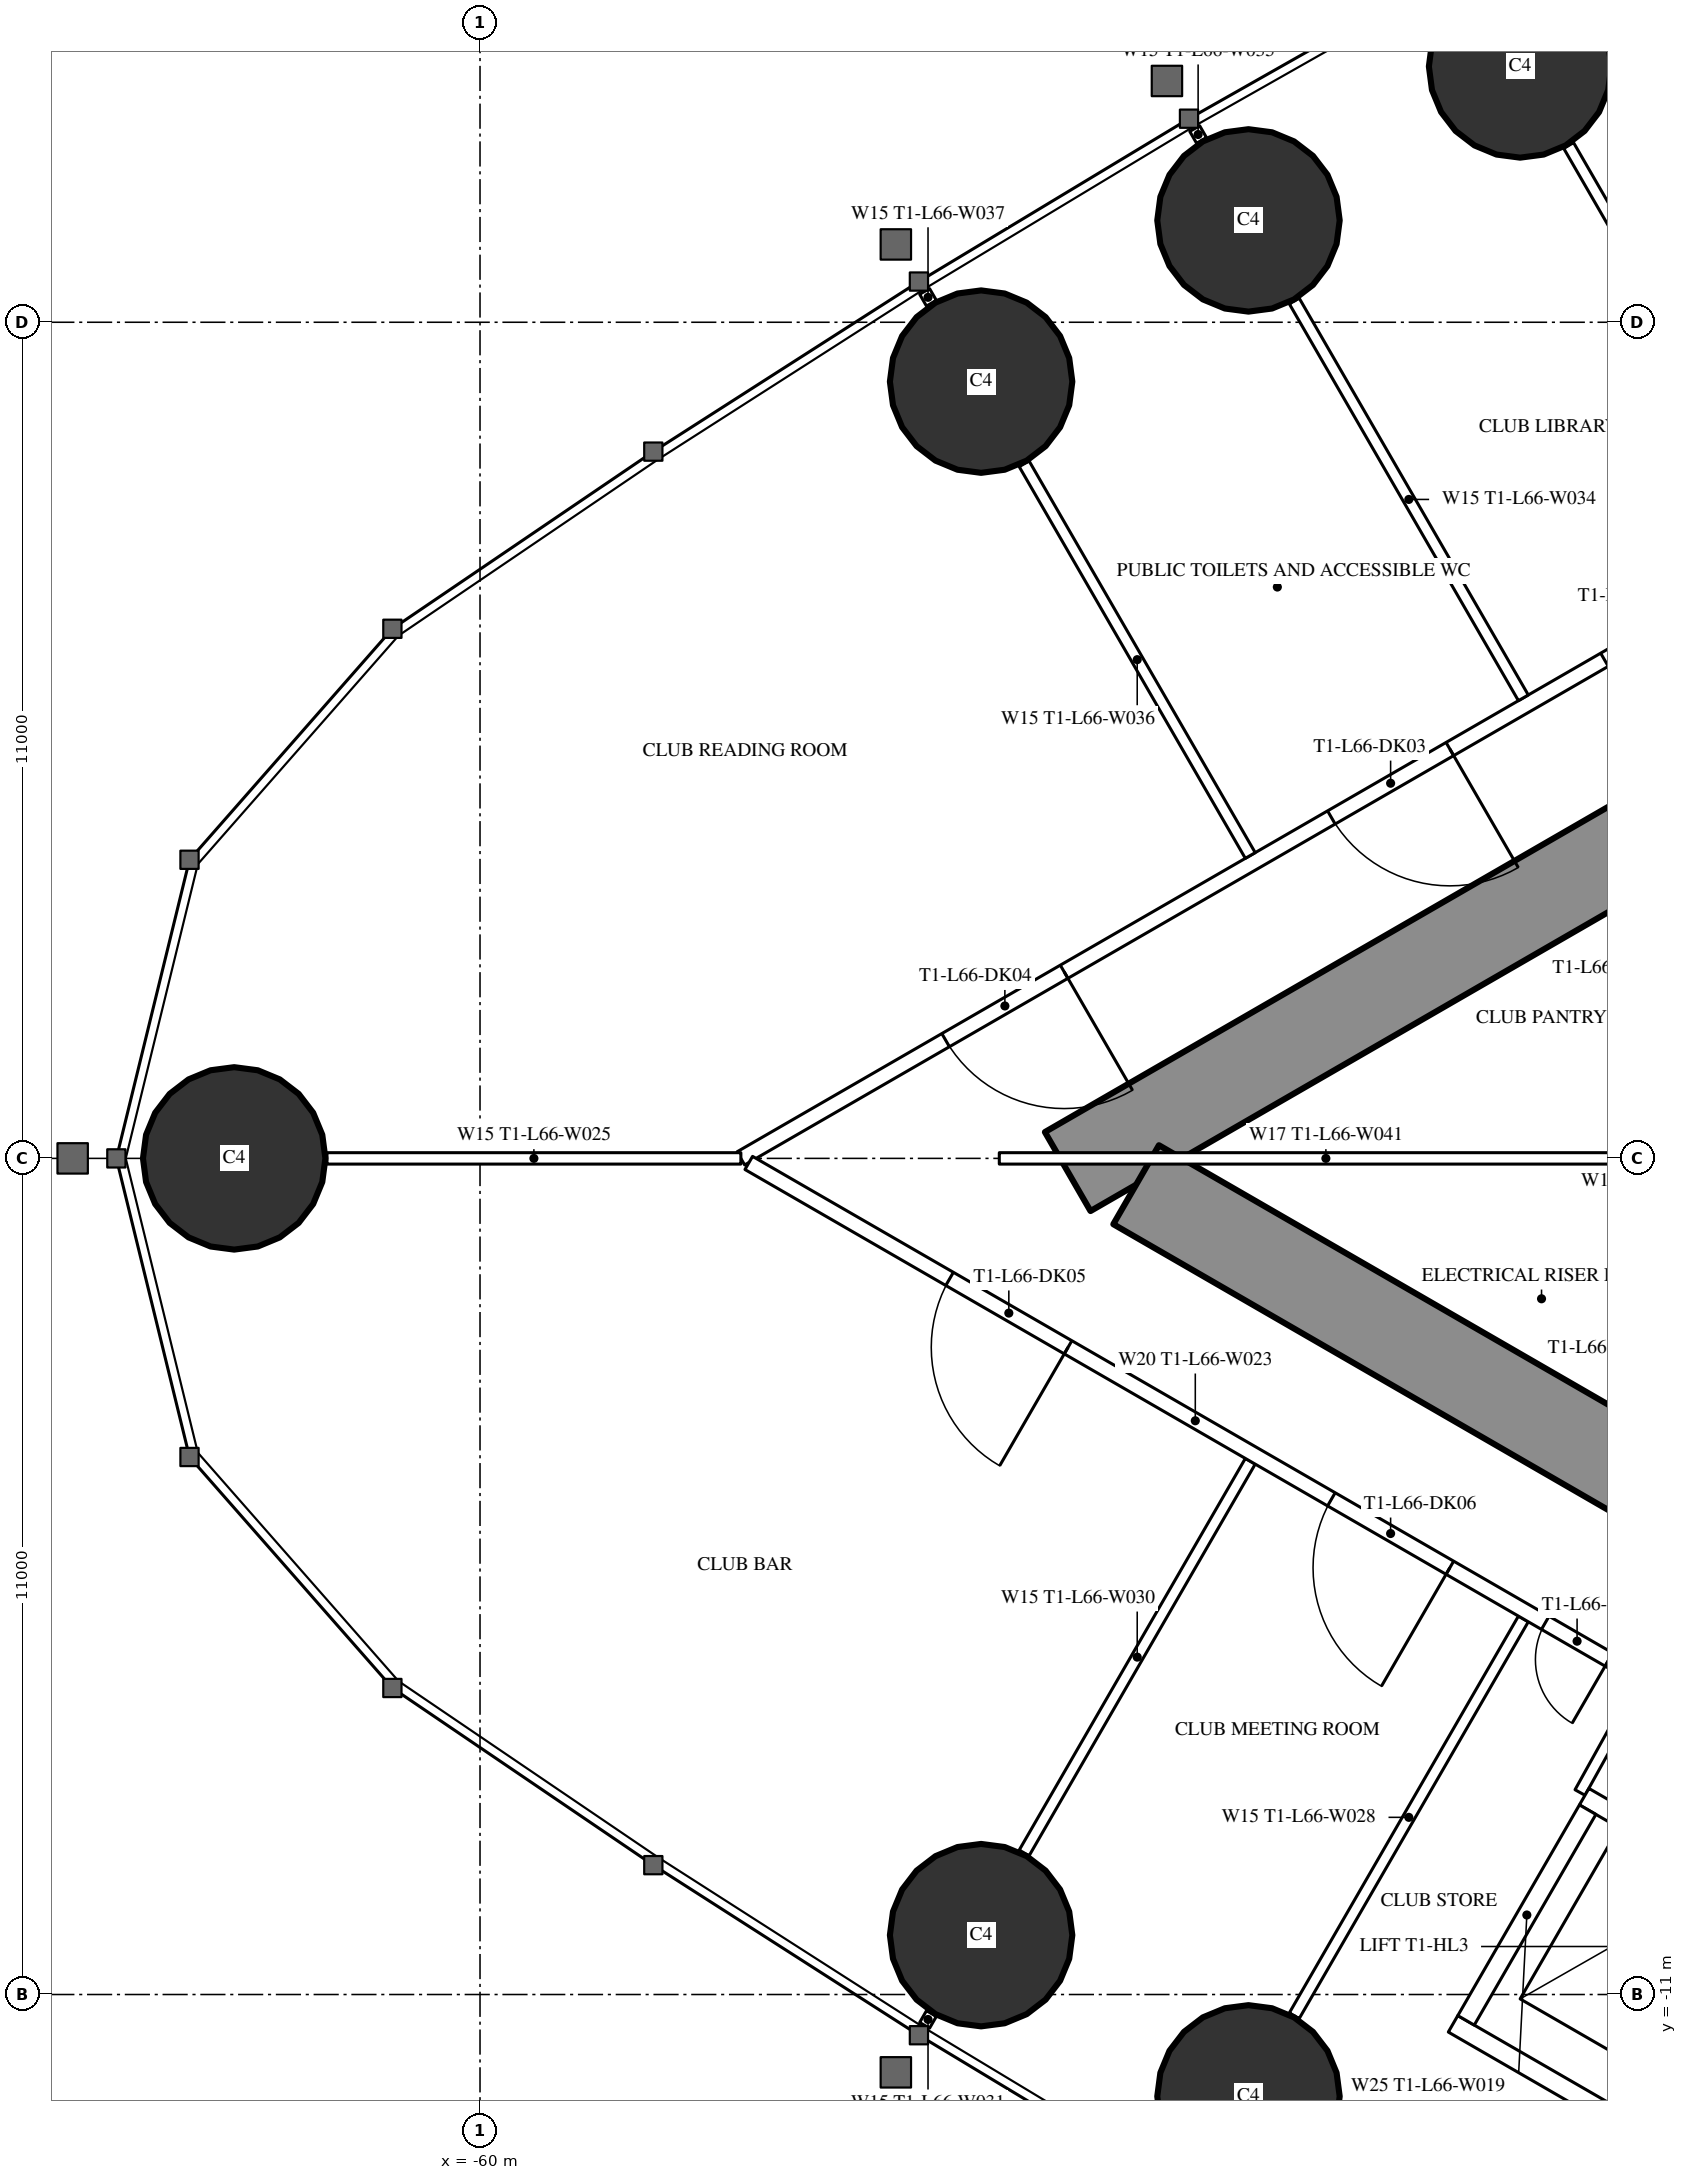
"""IFC4 building model, lengths in metres.
Left out: names, types, materials, properties, quantities, classifications, styles, units other than length and angle.
Written with IfcOpenShell. Run it as: python <this file> out.ifc"""

import sys

from ifc_helpers import new_model, si_unit, direction, frame, frame_2d, origin, origin_2d, place, context, subcontext, project, spatial, rectangle, circle, extrude, element, fill, save


model = new_model("IFC4")
c1 = context("Model", 3, precision=1e-05, world=origin(), true_north=direction((0.0, 1.0)))
c2 = subcontext(c1, "Body", "Model", "MODEL_VIEW")
j1 = project(units=[si_unit("LENGTHUNIT", "METRE"), si_unit("PLANEANGLEUNIT", "RADIAN")], contexts=[c1])
p1 = place(None, origin())
s1 = spatial("IfcSite", under=j1, at=p1, CompositionType="ELEMENT")
p2 = place(p1, origin())
s2 = spatial("IfcBuilding", under=s1, at=p2, CompositionType="ELEMENT")
p3 = place(p2, frame((0.0, 0.0, 247.7)))
s3 = spatial("IfcBuildingStorey", under=s2, at=p3, CompositionType="ELEMENT", Elevation=247.7)
for number, where, z_axis, x_axis in (
    (1, (-63.234, 0.0, 0.0), (0.0, 0.0, 1.0), (1.0, 0.0, 0.0)),
    (2, (-53.408, -10.219, 0.0), (0.0, 0.0, 1.0), (1.0, 0.0, 0.0)),
    (3, (-49.89, -12.34, 0.0), (0.0, 0.0, 1.0), (1.0, 0.0, 0.0)),
    (4, (-46.317, 14.365, 0.0), (0.0, 0.0, 1.0), (1.0, 0.0, 0.0)),
    (5, (-49.89, 12.34, 0.0), (0.0, 0.0, 1.0), (1.0, 0.0, 0.0)),
    (6, (-53.408, 10.219, 0.0), (0.0, 0.0, 1.0), (1.0, 0.0, 0.0)),
):
    element("IfcColumn", number, at=place(p3, frame(where, z_axis=z_axis, x_axis=x_axis)), inside=s3, PredefinedType="COLUMN", context=c2, shape_type="SweptSolid", body=[
        extrude(circle(Radius=1.2, at=origin_2d()), origin(), (0.0, 0.0, 1.0), 4.2),
    ])
p4 = place(p3, frame((-27.2, 14.3, 0.0), z_axis=(0.0, 0.0, 1.0), x_axis=(-0.866026593062, -0.499997940104, 0.0)))
e7 = element("IfcWall", 7, at=p4, inside=s3, PredefinedType="SHEAR", context=c2, shape_type="SweptSolid", body=[
    extrude(rectangle(XDim=28.946, YDim=1.2, at=frame_2d((14.473, 0.0))), origin(), (0.0, 0.0, 1.0), 4.2),
])
p5 = place(p4, frame((4.6, 0.0, 0.0)))
e8 = element("IfcOpeningElement", 8, at=p5, cuts=e7, PredefinedType="OPENING", context=c2, shape_type="SweptSolid", body=[
    extrude(rectangle(XDim=1.0, YDim=2.2, at=frame_2d((0.5, 1.1))), frame((0.0, 0.61, 0.0), z_axis=(0.0, -1.0, 0.0), x_axis=(1.0, 0.0, 0.0)), (0.0, 0.0, 1.0), 1.22),
])
p6 = place(p4, frame((13.395, 0.0, 0.0)))
e9 = element("IfcOpeningElement", 9, at=p6, cuts=e7, PredefinedType="OPENING", context=c2, shape_type="SweptSolid", body=[
    extrude(rectangle(XDim=1.8, YDim=2.2, at=frame_2d((0.9, 1.1))), frame((0.0, 0.61, 0.0), z_axis=(0.0, -1.0, 0.0), x_axis=(1.0, 0.0, 0.0)), (0.0, 0.0, 1.0), 1.22),
])
p7 = place(p3, frame((-27.2, -14.3, 0.0), z_axis=(0.0, 0.0, 1.0), x_axis=(-0.866024021859, 0.500002393557, 0.0)))
e10 = element("IfcWall", 10, at=p7, inside=s3, PredefinedType="SHEAR", context=c2, shape_type="SweptSolid", body=[
    extrude(rectangle(XDim=27.907, YDim=1.2, at=frame_2d((13.954, 0.0))), origin(), (0.0, 0.0, 1.0), 4.2),
])
p8 = place(p7, frame((4.6, 0.0, 0.0)))
e11 = element("IfcOpeningElement", 11, at=p8, cuts=e10, PredefinedType="OPENING", context=c2, shape_type="SweptSolid", body=[
    extrude(rectangle(XDim=1.0, YDim=2.2, at=frame_2d((0.5, 1.1))), frame((0.0, 0.61, 0.0), z_axis=(0.0, -1.0, 0.0), x_axis=(1.0, 0.0, 0.0)), (0.0, 0.0, 1.0), 1.22),
])
p9 = place(p7, frame((13.395, 0.0, 0.0)))
e12 = element("IfcOpeningElement", 12, at=p9, cuts=e10, PredefinedType="OPENING", context=c2, shape_type="SweptSolid", body=[
    extrude(rectangle(XDim=1.8, YDim=2.2, at=frame_2d((0.9, 1.1))), frame((0.0, 0.61, 0.0), z_axis=(0.0, -1.0, 0.0), x_axis=(1.0, 0.0, 0.0)), (0.0, 0.0, 1.0), 1.22),
])
p10 = place(p3, frame((-28.681, 16.101, 0.0), z_axis=(0.0, 0.0, 1.0), x_axis=(-0.866024860443, -0.500000941094, 0.0)))
e13 = element("IfcWall", 13, at=p10, inside=s3, PredefinedType="PARTITIONING", context=c2, shape_type="SweptSolid", body=[
    extrude(rectangle(XDim=32.201, YDim=0.2, at=frame_2d((16.101, 0.0))), origin(), (0.0, 0.0, 1.0), 3.95),
])
p11 = place(p10, frame((7.266, 0.0, 0.0)))
e14 = element("IfcOpeningElement", 14, at=p11, cuts=e13, PredefinedType="OPENING", context=c2, shape_type="SweptSolid", body=[
    extrude(rectangle(XDim=1.8, YDim=2.2, at=frame_2d((0.9, 1.1))), frame((0.0, 0.11, 0.0), z_axis=(0.0, -1.0, 0.0), x_axis=(1.0, 0.0, 0.0)), (0.0, 0.0, 1.0), 0.22),
])
p12 = place(p10, frame((17.281, 0.0, 0.0)))
e15 = element("IfcOpeningElement", 15, at=p12, cuts=e13, PredefinedType="OPENING", context=c2, shape_type="SweptSolid", body=[
    extrude(rectangle(XDim=1.8, YDim=2.2, at=frame_2d((0.9, 1.1))), frame((0.0, 0.11, 0.0), z_axis=(0.0, -1.0, 0.0), x_axis=(1.0, 0.0, 0.0)), (0.0, 0.0, 1.0), 0.22),
])
p13 = place(p10, frame((21.43, 0.0, 0.0)))
e16 = element("IfcOpeningElement", 16, at=p13, cuts=e13, PredefinedType="OPENING", context=c2, shape_type="SweptSolid", body=[
    extrude(rectangle(XDim=1.8, YDim=2.2, at=frame_2d((0.9, 1.1))), frame((0.0, 0.11, 0.0), z_axis=(0.0, -1.0, 0.0), x_axis=(1.0, 0.0, 0.0)), (0.0, 0.0, 1.0), 0.22),
])
p14 = place(p10, frame((27.29, 0.0, 0.0)))
e17 = element("IfcOpeningElement", 17, at=p14, cuts=e13, PredefinedType="OPENING", context=c2, shape_type="SweptSolid", body=[
    extrude(rectangle(XDim=1.8, YDim=2.2, at=frame_2d((0.9, 1.1))), frame((0.0, 0.11, 0.0), z_axis=(0.0, -1.0, 0.0), x_axis=(1.0, 0.0, 0.0)), (0.0, 0.0, 1.0), 0.22),
])
p15 = place(p3, frame((-42.68, 8.134, 0.0), z_axis=(0.0, 0.0, 1.0), x_axis=(-0.499984479505, 0.866034364361, 0.0)))
e18 = element("IfcWall", 18, at=p15, inside=s3, PredefinedType="PARTITIONING", context=c2, shape_type="SweptSolid", body=[
    extrude(rectangle(XDim=5.995, YDim=0.15, at=frame_2d((2.998, 0.0))), origin(), (0.0, 0.0, 1.0), 3.05),
])
p16 = place(p3, frame((-46.274, 6.059, 0.0), z_axis=(0.0, 0.0, 1.0), x_axis=(-0.500020471368, 0.866013584312, 0.0)))
e19 = element("IfcWall", 19, at=p16, inside=s3, PredefinedType="PARTITIONING", context=c2, shape_type="SweptSolid", body=[
    extrude(rectangle(XDim=6.028, YDim=0.15, at=frame_2d((3.014, 0.0))), origin(), (0.0, 0.0, 1.0), 3.05),
])
p17 = place(p3, frame((-50.508, 13.392, 0.0), z_axis=(0.0, 0.0, 1.0), x_axis=(-0.499644091975, 0.866230789891, 0.0)))
e20 = element("IfcWall", 20, at=p17, inside=s3, PredefinedType="PARTITIONING", context=c2, shape_type="SweptSolid", body=[
    extrude(rectangle(XDim=0.18, YDim=0.15, at=frame_2d((0.09, 0.0))), origin(), (0.0, 0.0, 1.0), 3.05),
])
p18 = place(p3, frame((-49.866, 3.985, 0.0), z_axis=(0.0, 0.0, 1.0), x_axis=(-0.500000694566, 0.866025002776, 0.0)))
e21 = element("IfcWall", 21, at=p18, inside=s3, PredefinedType="PARTITIONING", context=c2, shape_type="SweptSolid", body=[
    extrude(rectangle(XDim=5.95, YDim=0.15, at=frame_2d((2.975, 0.0))), origin(), (0.0, 0.0, 1.0), 3.05),
])
p19 = place(p3, frame((-54.061, 11.25, 0.0), z_axis=(0.0, 0.0, 1.0), x_axis=(-0.500391173478, 0.865799441849, 0.0)))
e22 = element("IfcWall", 22, at=p19, inside=s3, PredefinedType="PARTITIONING", context=c2, shape_type="SweptSolid", body=[
    extrude(rectangle(XDim=0.179, YDim=0.15, at=frame_2d((0.089, 0.0))), origin(), (0.0, 0.0, 1.0), 3.05),
])
p20 = place(p3, frame((-46.274, -6.059, 0.0), z_axis=(0.0, 0.0, 1.0), x_axis=(-0.500020471368, -0.866013584312, 0.0)))
e23 = element("IfcWall", 23, at=p20, inside=s3, PredefinedType="PARTITIONING", context=c2, shape_type="SweptSolid", body=[
    extrude(rectangle(XDim=6.028, YDim=0.15, at=frame_2d((3.014, 0.0))), origin(), (0.0, 0.0, 1.0), 3.05),
])
p21 = place(p3, frame((-49.866, -3.985, 0.0), z_axis=(0.0, 0.0, 1.0), x_axis=(-0.500000694566, -0.866025002776, 0.0)))
e24 = element("IfcWall", 24, at=p21, inside=s3, PredefinedType="PARTITIONING", context=c2, shape_type="SweptSolid", body=[
    extrude(rectangle(XDim=5.95, YDim=0.15, at=frame_2d((2.975, 0.0))), origin(), (0.0, 0.0, 1.0), 3.05),
])
p22 = place(p3, frame((-54.061, -11.25, 0.0), z_axis=(0.0, 0.0, 1.0), x_axis=(-0.500391173478, -0.865799441849, 0.0)))
e25 = element("IfcWall", 25, at=p22, inside=s3, PredefinedType="PARTITIONING", context=c2, shape_type="SweptSolid", body=[
    extrude(rectangle(XDim=0.179, YDim=0.15, at=frame_2d((0.089, 0.0))), origin(), (0.0, 0.0, 1.0), 3.05),
])
p23 = place(p3, frame((-56.568, 0.0, 0.0), z_axis=(0.0, 0.0, 1.0), x_axis=(-1.0, 0.0, 0.0)))
e26 = element("IfcWall", 26, at=p23, inside=s3, PredefinedType="PARTITIONING", context=c2, shape_type="SweptSolid", body=[
    extrude(rectangle(XDim=5.446, YDim=0.15, at=frame_2d((2.723, 0.0))), origin(), (0.0, 0.0, 1.0), 3.05),
])
p24 = place(p3, frame((-44.715, -6.844, 0.0), z_axis=(0.0, 0.0, 1.0), x_axis=(-0.866025261224, 0.500000246922, 0.0)))
e27 = element("IfcWall", 27, at=p24, inside=s3, PredefinedType="PARTITIONING", context=c2, shape_type="SweptSolid", body=[
    extrude(rectangle(XDim=13.567, YDim=0.2, at=frame_2d((6.783, 0.0))), origin(), (0.0, 0.0, 1.0), 3.95),
])
p25 = place(p24, frame((8.716, 0.0, 0.0)))
e28 = element("IfcOpeningElement", 28, at=p25, cuts=e27, PredefinedType="OPENING", context=c2, shape_type="SweptSolid", body=[
    extrude(rectangle(XDim=1.8, YDim=2.2, at=frame_2d((0.9, 1.1))), frame((0.0, 0.11, 0.0), z_axis=(0.0, -1.0, 0.0), x_axis=(1.0, 0.0, 0.0)), (0.0, 0.0, 1.0), 0.22),
])
p26 = place(p24, frame((2.916, 0.0, 0.0)))
e29 = element("IfcOpeningElement", 29, at=p26, cuts=e27, PredefinedType="OPENING", context=c2, shape_type="SweptSolid", body=[
    extrude(rectangle(XDim=1.8, YDim=2.2, at=frame_2d((0.9, 1.1))), frame((0.0, 0.11, 0.0), z_axis=(0.0, -1.0, 0.0), x_axis=(1.0, 0.0, 0.0)), (0.0, 0.0, 1.0), 0.22),
])
p27 = place(p24, frame((0.5, 0.0, 0.0)))
e30 = element("IfcOpeningElement", 30, at=p27, cuts=e27, PredefinedType="OPENING", context=c2, shape_type="SweptSolid", body=[
    extrude(rectangle(XDim=0.967, YDim=2.2, at=frame_2d((0.483, 1.1))), frame((0.0, 0.11, 0.0), z_axis=(0.0, -1.0, 0.0), x_axis=(1.0, 0.0, 0.0)), (0.0, 0.0, 1.0), 0.22),
])
p28 = place(p3, frame((-44.652, -6.764, 0.0), z_axis=(0.0, 0.0, 1.0), x_axis=(-0.485528096672, -0.8742210632, 0.0)))
e31 = element("IfcWall", 31, at=p28, inside=s3, PredefinedType="PARTITIONING", context=c2, shape_type="SweptSolid", body=[
    extrude(rectangle(XDim=1.805, YDim=0.15, at=frame_2d((0.903, 0.0))), origin(), (0.0, 0.0, 1.0), 3.95),
])
p29 = place(p3, frame((-44.575, 0.0, 0.0), z_axis=(0.0, 0.0, 1.0), x_axis=(-1.0, 0.0, 0.0)))
e32 = element("IfcWall", 32, at=p29, inside=s3, PredefinedType="PARTITIONING", context=c2, shape_type="SweptSolid", body=[
    extrude(rectangle(XDim=8.593, YDim=0.15, at=frame_2d((4.297, 0.0))), origin(), (0.0, 0.0, 1.0), 3.05),
])
p30 = place(p3, frame((-39.758, -11.697, 0.0), z_axis=(0.0, 0.0, 1.0), x_axis=(-0.866024194504, 0.500002094529, 0.0)))
e33 = element("IfcWall", 33, at=p30, inside=s3, PredefinedType="PARTITIONING", context=c2, shape_type="SweptSolid", body=[
    extrude(rectangle(XDim=6.6, YDim=0.25, at=frame_2d((3.3, 0.0))), origin(), (0.0, 0.0, 1.0), 3.95),
])
p31 = place(p30, frame((0.75, 0.0, 0.0)))
e34 = element("IfcOpeningElement", 34, at=p31, cuts=e33, PredefinedType="OPENING", context=c2, shape_type="SweptSolid", body=[
    extrude(rectangle(XDim=1.1, YDim=2.2, at=frame_2d((0.55, 1.1))), frame((0.0, 0.135, 0.0), z_axis=(0.0, -1.0, 0.0), x_axis=(1.0, 0.0, 0.0)), (0.0, 0.0, 1.0), 0.27),
])
p32 = place(p30, frame((2.75, 0.0, 0.0)))
e35 = element("IfcOpeningElement", 35, at=p32, cuts=e33, PredefinedType="OPENING", context=c2, shape_type="SweptSolid", body=[
    extrude(rectangle(XDim=1.1, YDim=2.2, at=frame_2d((0.55, 1.1))), frame((0.0, 0.135, 0.0), z_axis=(0.0, -1.0, 0.0), x_axis=(1.0, 0.0, 0.0)), (0.0, 0.0, 1.0), 0.27),
])
p33 = place(p30, frame((4.75, 0.0, 0.0)))
e36 = element("IfcOpeningElement", 36, at=p33, cuts=e33, PredefinedType="OPENING", context=c2, shape_type="SweptSolid", body=[
    extrude(rectangle(XDim=1.1, YDim=2.2, at=frame_2d((0.55, 1.1))), frame((0.0, 0.135, 0.0), z_axis=(0.0, -1.0, 0.0), x_axis=(1.0, 0.0, 0.0)), (0.0, 0.0, 1.0), 0.27),
])
p34 = place(p3, frame((-41.482, -14.686, 0.0), z_axis=(0.0, 0.0, 1.0), x_axis=(-0.86603344179, 0.499986077507, 0.0)))
e37 = element("IfcWall", 37, at=p34, inside=s3, PredefinedType="PARTITIONING", context=c2, shape_type="SweptSolid", body=[
    extrude(rectangle(XDim=6.6, YDim=0.25, at=frame_2d((3.3, 0.0))), origin(), (0.0, 0.0, 1.0), 3.95),
])
p35 = place(p3, frame((-45.428, -8.568, 0.0), z_axis=(0.0, 0.0, 1.0), x_axis=(-0.499929347863, -0.866066190972, 0.0)))
e38 = element("IfcWall", 38, at=p35, inside=s3, PredefinedType="PARTITIONING", context=c2, shape_type="SweptSolid", body=[
    extrude(rectangle(XDim=3.201, YDim=0.25, at=frame_2d((1.6, 0.0))), origin(), (0.0, 0.0, 1.0), 3.95),
])
p36 = place(p12, origin())
e39 = element("IfcDoor", 39, at=p36, inside=s3, OperationType="DOUBLE_DOOR_SINGLE_SWING", PredefinedType="DOOR", context=c2, shape_type="SweptSolid", body=[
    extrude(rectangle(XDim=1.8, YDim=2.2, at=frame_2d((0.9, 1.1))), frame((0.0, 0.025, 0.0), z_axis=(0.0, -1.0, 0.0), x_axis=(1.0, 0.0, 0.0)), (0.0, 0.0, 1.0), 0.05),
])
fill(e15, e39)
p37 = place(p13, origin())
e40 = element("IfcDoor", 40, at=p37, inside=s3, OperationType="DOUBLE_DOOR_SINGLE_SWING", PredefinedType="DOOR", context=c2, shape_type="SweptSolid", body=[
    extrude(rectangle(XDim=1.8, YDim=2.2, at=frame_2d((0.9, 1.1))), frame((0.0, 0.025, 0.0), z_axis=(0.0, -1.0, 0.0), x_axis=(1.0, 0.0, 0.0)), (0.0, 0.0, 1.0), 0.05),
])
fill(e16, e40)
p38 = place(p14, origin())
e41 = element("IfcDoor", 41, at=p38, inside=s3, OperationType="DOUBLE_DOOR_SINGLE_SWING", PredefinedType="DOOR", context=c2, shape_type="SweptSolid", body=[
    extrude(rectangle(XDim=1.8, YDim=2.2, at=frame_2d((0.9, 1.1))), frame((0.0, 0.025, 0.0), z_axis=(0.0, -1.0, 0.0), x_axis=(1.0, 0.0, 0.0)), (0.0, 0.0, 1.0), 0.05),
])
fill(e17, e41)
p39 = place(p25, origin())
e42 = element("IfcDoor", 42, at=p39, inside=s3, OperationType="DOUBLE_DOOR_SINGLE_SWING", PredefinedType="DOOR", context=c2, shape_type="SweptSolid", body=[
    extrude(rectangle(XDim=1.8, YDim=2.2, at=frame_2d((0.9, 1.1))), frame((0.0, 0.025, 0.0), z_axis=(0.0, -1.0, 0.0), x_axis=(1.0, 0.0, 0.0)), (0.0, 0.0, 1.0), 0.05),
])
fill(e28, e42)
p40 = place(p26, origin())
e43 = element("IfcDoor", 43, at=p40, inside=s3, OperationType="DOUBLE_DOOR_SINGLE_SWING", PredefinedType="DOOR", context=c2, shape_type="SweptSolid", body=[
    extrude(rectangle(XDim=1.8, YDim=2.2, at=frame_2d((0.9, 1.1))), frame((0.0, 0.025, 0.0), z_axis=(0.0, -1.0, 0.0), x_axis=(1.0, 0.0, 0.0)), (0.0, 0.0, 1.0), 0.05),
])
fill(e29, e43)
p41 = place(p27, origin())
e44 = element("IfcDoor", 44, at=p41, inside=s3, OperationType="SINGLE_SWING_LEFT", PredefinedType="DOOR", context=c2, shape_type="SweptSolid", body=[
    extrude(rectangle(XDim=0.967, YDim=2.2, at=frame_2d((0.483, 1.1))), frame((0.0, 0.025, 0.0), z_axis=(0.0, -1.0, 0.0), x_axis=(1.0, 0.0, 0.0)), (0.0, 0.0, 1.0), 0.05),
])
fill(e30, e44)
save(model, sys.argv[1])
